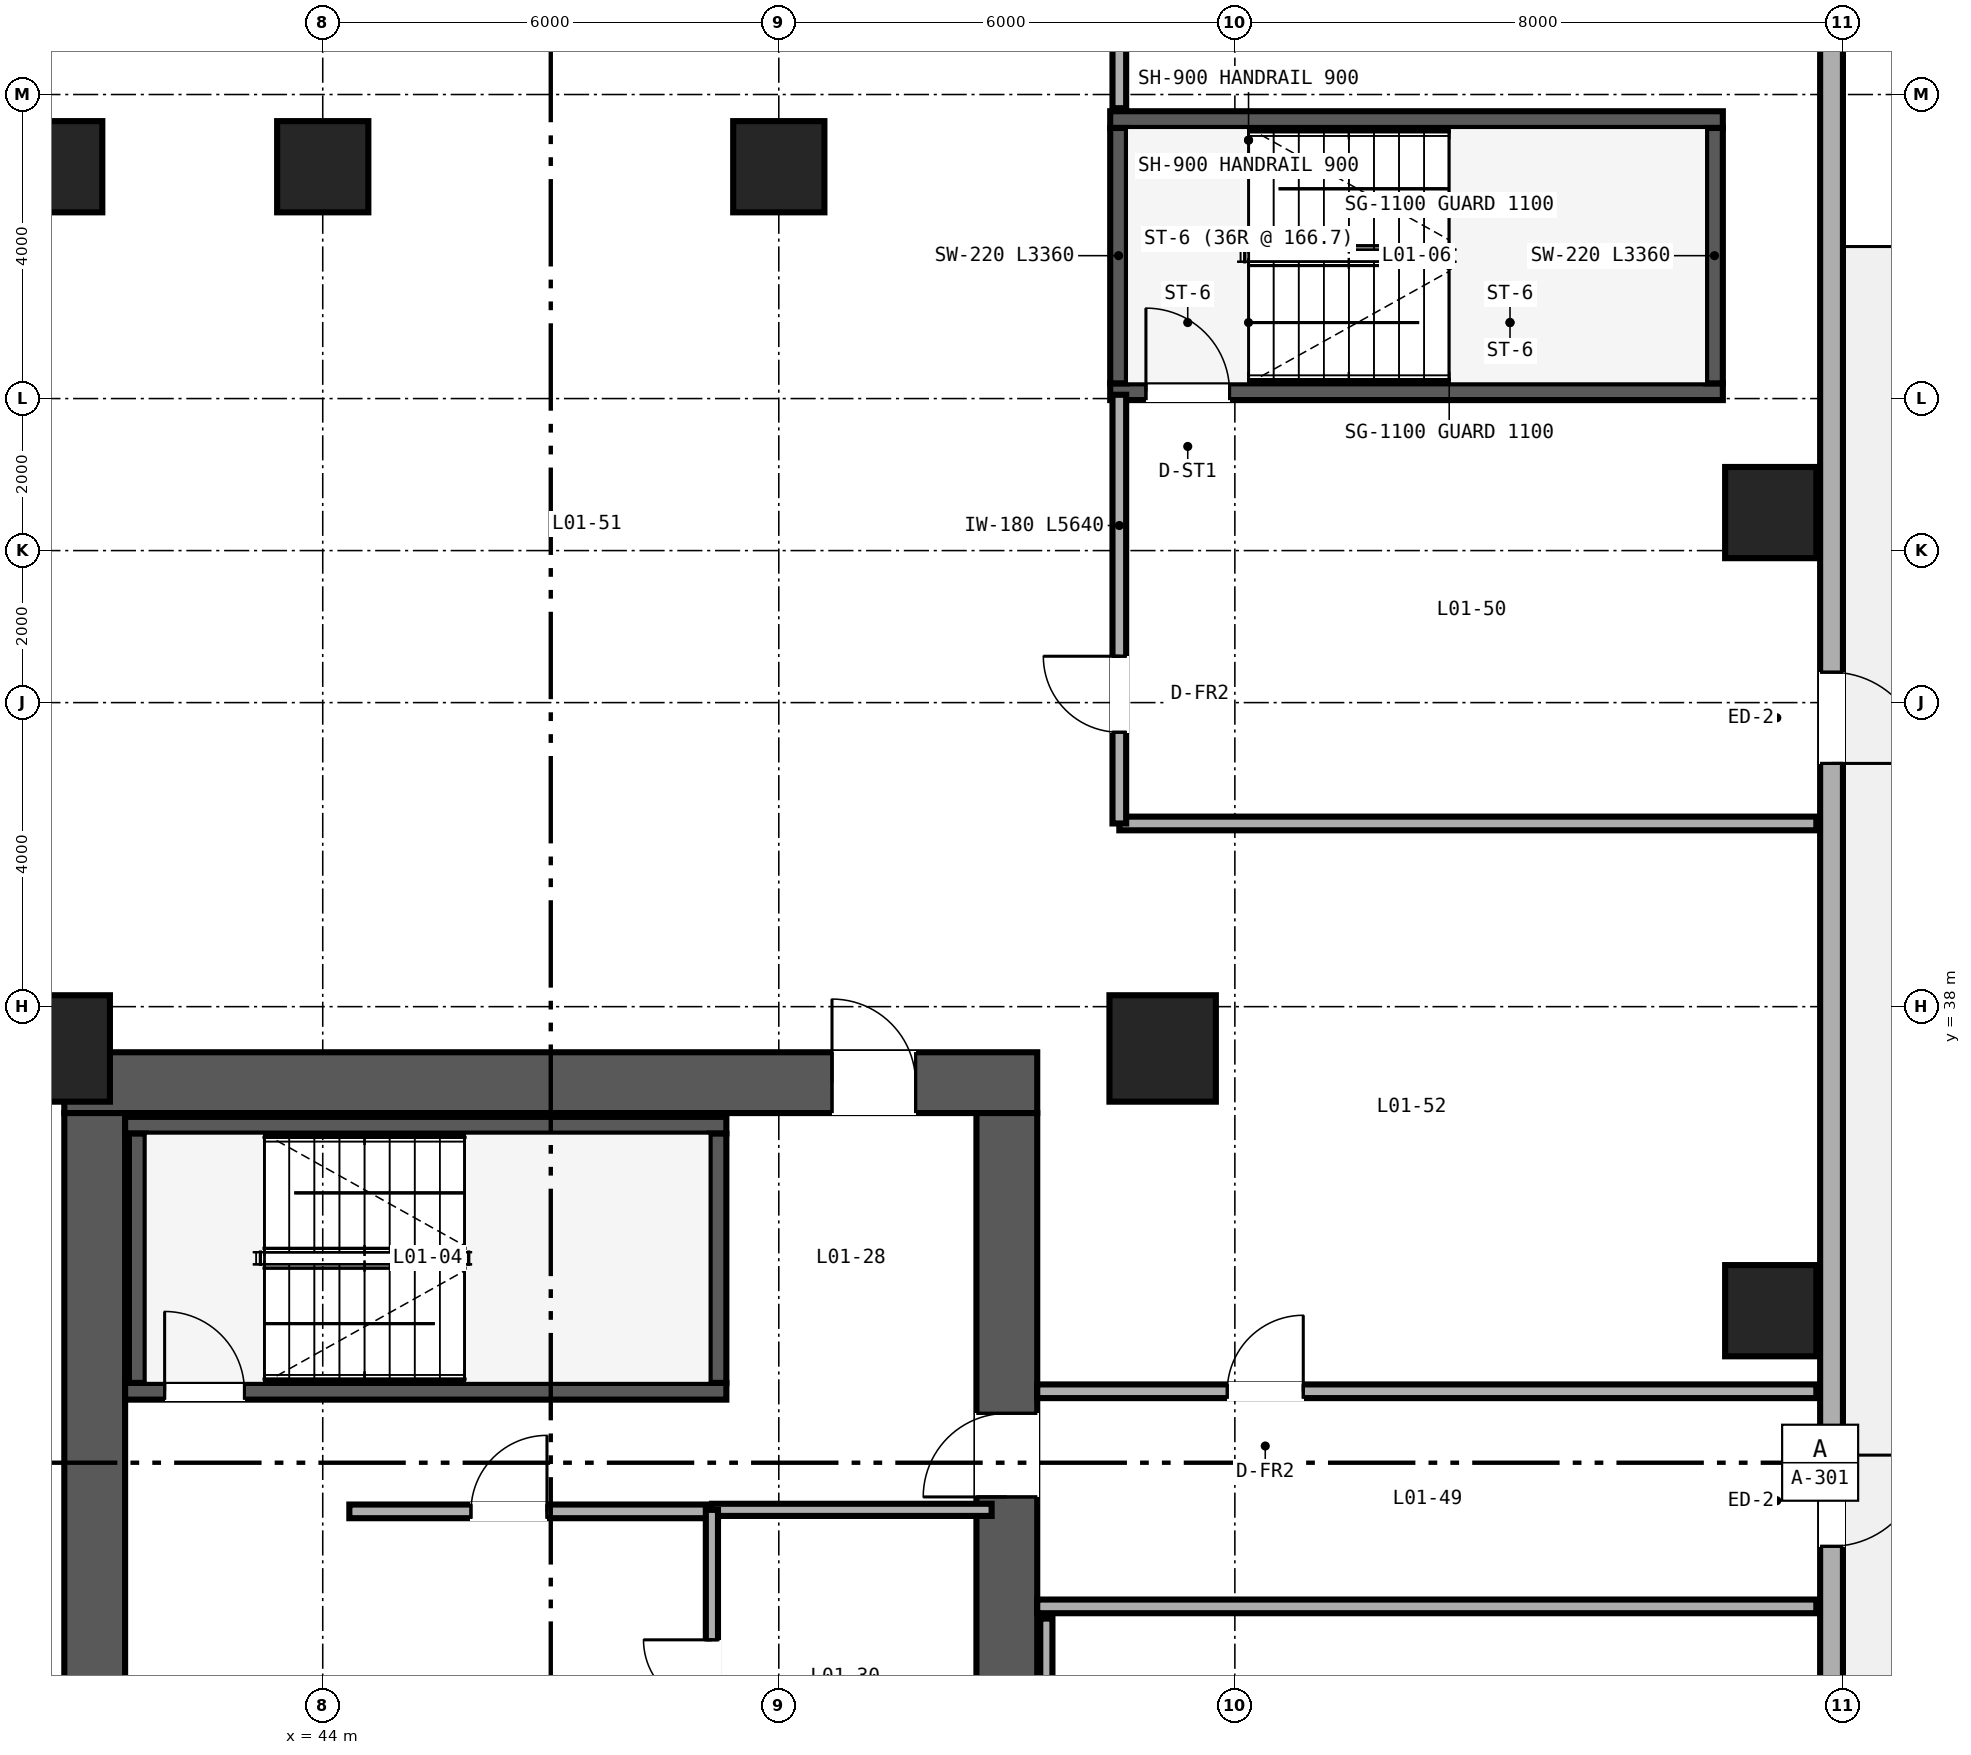
"""IFC4 building model, lengths in metres.
Left out: names, types, materials, properties, quantities, classifications, styles, units other than length and angle.
Written with IfcOpenShell. Run it as: python <this file> out.ifc"""

import sys

from ifc_helpers import new_model, si_unit, direction, frame, frame_2d, origin, origin_2d, place, context, subcontext, project, spatial, rectangle, extrude, source, transform, mapped, element, fill, save


model = new_model("IFC4")
c1 = context("Model", 3, precision=1e-05, world=origin(), true_north=direction((0.0, 1.0)))
c2 = subcontext(c1, "Body", "Model", "MODEL_VIEW")
j1 = project(units=[si_unit("LENGTHUNIT", "METRE"), si_unit("PLANEANGLEUNIT", "RADIAN")], contexts=[c1])
p1 = place(None, origin())
s1 = spatial("IfcSite", under=j1, at=p1, CompositionType="ELEMENT")
p2 = place(p1, origin())
s2 = spatial("IfcBuilding", under=s1, at=p2, CompositionType="ELEMENT")
p3 = place(p2, origin())
s3 = spatial("IfcBuildingStorey", under=s2, at=p3, CompositionType="ELEMENT", Elevation=0.0)
p4 = place(p3, frame((40.6, 37.0, 0.0), z_axis=(0.0, 0.0, 1.0), x_axis=(1.0, 0.0, 0.0)))
e1 = element("IfcWall", 1, at=p4, inside=s3, PredefinedType="SHEAR", context=c2, shape_type="SweptSolid", body=[
    extrude(rectangle(XDim=12.8, YDim=0.8, at=frame_2d((6.4, 0.0))), origin(), (0.0, 0.0, 1.0), 5.71),
])
p5 = place(p4, frame((10.1, 0.0, 0.0)))
e2 = element("IfcOpeningElement", 2, at=p5, cuts=e1, PredefinedType="OPENING", context=c2, shape_type="SweptSolid", body=[
    extrude(rectangle(XDim=1.1, YDim=2.15, at=frame_2d((0.55, 1.075))), frame((0.0, 0.41, 0.0), z_axis=(0.0, -1.0, 0.0), x_axis=(1.0, 0.0, 0.0)), (0.0, 0.0, 1.0), 0.82),
])
p6 = place(p3, frame((41.0, 15.4, 0.0), z_axis=(0.0, 0.0, 1.0), x_axis=(0.0, 1.0, 0.0)))
e3 = element("IfcWall", 3, at=p6, inside=s3, PredefinedType="SHEAR", context=c2, shape_type="SweptSolid", body=[
    extrude(rectangle(XDim=21.2, YDim=0.8, at=frame_2d((10.6, 0.0))), origin(), (0.0, 0.0, 1.0), 5.71),
])
p7 = place(p3, frame((53.0, 15.4, 0.0), z_axis=(0.0, 0.0, 1.0), x_axis=(0.0, 1.0, 0.0)))
e4 = element("IfcWall", 4, at=p7, inside=s3, PredefinedType="SHEAR", context=c2, shape_type="SweptSolid", body=[
    extrude(rectangle(XDim=21.2, YDim=0.8, at=frame_2d((10.6, 0.0))), origin(), (0.0, 0.0, 1.0), 5.71),
])
p8 = place(p7, frame((16.15, 0.0, 0.0)))
e5 = element("IfcOpeningElement", 5, at=p8, cuts=e4, PredefinedType="OPENING", context=c2, shape_type="SweptSolid", body=[
    extrude(rectangle(XDim=1.1, YDim=2.15, at=frame_2d((0.55, 1.075))), frame((0.0, 0.41, 0.0), z_axis=(0.0, -1.0, 0.0), x_axis=(1.0, 0.0, 0.0)), (0.0, 0.0, 1.0), 0.82),
])
p9 = place(p3, frame((41.4, 32.94, 0.0), z_axis=(0.0, 0.0, 1.0), x_axis=(1.0, 0.0, 0.0)))
e6 = element("IfcWall", 6, at=p9, inside=s3, PredefinedType="SHEAR", context=c2, shape_type="SweptSolid", body=[
    extrude(rectangle(XDim=7.91, YDim=0.22, at=frame_2d((3.955, 0.0))), origin(), (0.0, 0.0, 1.0), 5.8),
])
p10 = place(p9, frame((0.52, 0.0, 0.0)))
e7 = element("IfcOpeningElement", 7, at=p10, cuts=e6, PredefinedType="OPENING", context=c2, shape_type="SweptSolid", body=[
    extrude(rectangle(XDim=1.05, YDim=2.15, at=frame_2d((0.525, 1.075))), frame((0.0, 0.12, 0.0), z_axis=(0.0, -1.0, 0.0), x_axis=(1.0, 0.0, 0.0)), (0.0, 0.0, 1.0), 0.24),
])
p11 = place(p3, frame((41.4, 36.44, 0.0), z_axis=(0.0, 0.0, 1.0), x_axis=(1.0, 0.0, 0.0)))
e8 = element("IfcWall", 8, at=p11, inside=s3, PredefinedType="SHEAR", context=c2, shape_type="SweptSolid", body=[
    extrude(rectangle(XDim=7.91, YDim=0.22, at=frame_2d((3.955, 0.0))), origin(), (0.0, 0.0, 1.0), 5.8),
])
for number, where, z_axis, x_axis in (
    (9, (41.56, 33.05, 0.0), (0.0, 0.0, 1.0), (0.0, 1.0, 0.0)),
    (10, (49.2, 33.05, 0.0), (0.0, 0.0, 1.0), (0.0, 1.0, 0.0)),
):
    element("IfcWall", number, at=place(p3, frame(where, z_axis=z_axis, x_axis=x_axis)), inside=s3, PredefinedType="SHEAR", context=c2, shape_type="SweptSolid", body=[
        extrude(rectangle(XDim=3.28, YDim=0.22, at=frame_2d((1.64, 0.0))), origin(), (0.0, 0.0, 1.0), 5.8),
    ])
p12 = place(p3, frame((54.36, 46.09, 0.0), z_axis=(0.0, 0.0, 1.0), x_axis=(1.0, 0.0, 0.0)))
e11 = element("IfcWall", 11, at=p12, inside=s3, PredefinedType="SHEAR", context=c2, shape_type="SweptSolid", body=[
    extrude(rectangle(XDim=8.06, YDim=0.22, at=frame_2d((4.03, 0.0))), origin(), (0.0, 0.0, 1.0), 5.8),
])
p13 = place(p12, frame((0.47, 0.0, 0.0)))
e12 = element("IfcOpeningElement", 12, at=p13, cuts=e11, PredefinedType="OPENING", context=c2, shape_type="SweptSolid", body=[
    extrude(rectangle(XDim=1.1, YDim=2.15, at=frame_2d((0.55, 1.075))), frame((0.0, 0.12, 0.0), z_axis=(0.0, -1.0, 0.0), x_axis=(1.0, 0.0, 0.0)), (0.0, 0.0, 1.0), 0.24),
])
p14 = place(p3, frame((54.36, 49.67, 0.0), z_axis=(0.0, 0.0, 1.0), x_axis=(1.0, 0.0, 0.0)))
e13 = element("IfcWall", 13, at=p14, inside=s3, PredefinedType="SHEAR", context=c2, shape_type="SweptSolid", body=[
    extrude(rectangle(XDim=8.06, YDim=0.22, at=frame_2d((4.03, 0.0))), origin(), (0.0, 0.0, 1.0), 5.8),
])
for number, where, z_axis, x_axis in (
    (14, (54.47, 46.2, 0.0), (0.0, 0.0, 1.0), (0.0, 1.0, 0.0)),
    (15, (62.31, 46.2, 0.0), (0.0, 0.0, 1.0), (0.0, 1.0, 0.0)),
):
    element("IfcWall", number, at=place(p3, frame(where, z_axis=z_axis, x_axis=x_axis)), inside=s3, PredefinedType="SHEAR", context=c2, shape_type="SweptSolid", body=[
        extrude(rectangle(XDim=3.36, YDim=0.22, at=frame_2d((1.68, 0.0))), origin(), (0.0, 0.0, 1.0), 5.8),
    ])
m1 = source(origin(), c2, "Body", "SweptSolid", [
    extrude(rectangle(XDim=1.2, YDim=1.2, at=origin_2d()), origin(), (0.0, 0.0, 1.0), 5.71),
])
for number, where, z_axis, x_axis in (
    (16, (63.05, 34.0, 0.0), (0.0, 0.0, 1.0), (1.0, 0.0, 0.0)),
    (17, (63.05, 44.5, 0.0), (0.0, 0.0, 1.0), (1.0, 0.0, 0.0)),
):
    element("IfcColumn", number, at=place(p3, frame(where, z_axis=z_axis, x_axis=x_axis)), inside=s3, PredefinedType="COLUMN", context=c2, shape_type="MappedRepresentation", body=[
        mapped(m1, transform((0.0, 0.0, 0.0), scale=1.0)),
    ])
m2 = source(origin(), c2, "Body", "SweptSolid", [
    extrude(rectangle(XDim=1.4, YDim=1.4, at=origin_2d()), origin(), (0.0, 0.0, 1.0), 5.71),
])
for number, where, z_axis, x_axis in (
    (18, (40.5, 37.45, 0.0), (0.0, 0.0, 1.0), (1.0, 0.0, 0.0)),
    (19, (55.05, 37.45, 0.0), (0.0, 0.0, 1.0), (1.0, 0.0, 0.0)),
):
    element("IfcColumn", number, at=place(p3, frame(where, z_axis=z_axis, x_axis=x_axis)), inside=s3, PredefinedType="COLUMN", context=c2, shape_type="MappedRepresentation", body=[
        mapped(m2, transform((0.0, 0.0, 0.0), scale=1.0)),
    ])
for number, where, z_axis, x_axis in (
    (20, (40.5, 49.05, 0.0), (0.0, 0.0, 1.0), (1.0, 0.0, 0.0)),
    (21, (44.0, 49.05, 0.0), (0.0, 0.0, 1.0), (1.0, 0.0, 0.0)),
    (22, (50.0, 49.05, 0.0), (0.0, 0.0, 1.0), (1.0, 0.0, 0.0)),
):
    element("IfcColumn", number, at=place(p3, frame(where, z_axis=z_axis, x_axis=x_axis)), inside=s3, PredefinedType="COLUMN", context=c2, shape_type="MappedRepresentation", body=[
        mapped(m1, transform((0.0, 0.0, 0.0), scale=1.0)),
    ])
p15 = place(p3, frame((63.85, 51.7, 0.0), z_axis=(0.0, 0.0, 1.0), x_axis=(0.0, -1.0, 0.0)))
e23 = element("IfcWall", 23, at=p15, inside=s3, PredefinedType="SOLIDWALL", context=c2, shape_type="SweptSolid", body=[
    extrude(rectangle(XDim=51.4, YDim=0.3, at=frame_2d((25.7, 0.0))), origin(), (0.0, 0.0, 1.0), 5.71),
])
p16 = place(p15, frame((41.1, 0.0, 0.0)))
e24 = element("IfcOpeningElement", 24, at=p16, cuts=e23, PredefinedType="OPENING", context=c2, shape_type="SweptSolid", body=[
    extrude(rectangle(XDim=6.4, YDim=3.2, at=frame_2d((3.2, 1.6))), frame((0.0, 0.16, 0.0), z_axis=(0.0, -1.0, 0.0), x_axis=(1.0, 0.0, 0.0)), (0.0, 0.0, 1.0), 0.32),
])
p17 = place(p15, frame((24.7, 0.0, 0.0)))
e25 = element("IfcOpeningElement", 25, at=p17, cuts=e23, PredefinedType="OPENING", context=c2, shape_type="SweptSolid", body=[
    extrude(rectangle(XDim=4.2, YDim=3.8, at=frame_2d((2.1, 1.9))), frame((0.0, 0.16, 0.0), z_axis=(0.0, -1.0, 0.0), x_axis=(1.0, 0.0, 0.0)), (0.0, 0.0, 1.0), 0.32),
])
p18 = place(p15, frame((19.6, 0.0, 0.0)))
e26 = element("IfcOpeningElement", 26, at=p18, cuts=e23, PredefinedType="OPENING", context=c2, shape_type="SweptSolid", body=[
    extrude(rectangle(XDim=1.2, YDim=2.2, at=frame_2d((0.6, 1.1))), frame((0.0, 0.16, 0.0), z_axis=(0.0, -1.0, 0.0), x_axis=(1.0, 0.0, 0.0)), (0.0, 0.0, 1.0), 0.32),
])
p19 = place(p15, frame((9.3, 0.0, 0.0)))
e27 = element("IfcOpeningElement", 27, at=p19, cuts=e23, PredefinedType="OPENING", context=c2, shape_type="SweptSolid", body=[
    extrude(rectangle(XDim=1.2, YDim=2.2, at=frame_2d((0.6, 1.1))), frame((0.0, 0.16, 0.0), z_axis=(0.0, -1.0, 0.0), x_axis=(1.0, 0.0, 0.0)), (0.0, 0.0, 1.0), 0.32),
])
p20 = place(p3, frame((44.35, 31.36, 0.0), z_axis=(0.0, 0.0, 1.0), x_axis=(1.0, 0.0, 0.0)))
e28 = element("IfcWall", 28, at=p20, inside=s3, PredefinedType="SOLIDWALL", context=c2, shape_type="SweptSolid", body=[
    extrude(rectangle(XDim=4.85, YDim=0.18, at=frame_2d((2.425, 0.0))), origin(), (0.0, 0.0, 1.0), 4.61),
])
p21 = place(p20, frame((1.6, 0.0, 0.0)))
e29 = element("IfcOpeningElement", 29, at=p21, cuts=e28, PredefinedType="OPENING", context=c2, shape_type="SweptSolid", body=[
    extrude(rectangle(XDim=1.0, YDim=2.15, at=frame_2d((0.5, 1.075))), frame((0.0, 0.1, 0.0), z_axis=(0.0, -1.0, 0.0), x_axis=(1.0, 0.0, 0.0)), (0.0, 0.0, 1.0), 0.2),
])
p22 = place(p3, frame((49.12, 31.38, 0.0), z_axis=(0.0, 0.0, 1.0), x_axis=(1.0, 0.0, 0.0)))
e30 = element("IfcWall", 30, at=p22, inside=s3, PredefinedType="PARTITIONING", context=c2, shape_type="SweptSolid", body=[
    extrude(rectangle(XDim=3.68, YDim=0.16, at=frame_2d((1.84, 0.0))), origin(), (0.0, 0.0, 1.0), 4.61),
])
p23 = place(p3, frame((49.12, 26.97, 0.0), z_axis=(0.0, 0.0, 1.0), x_axis=(0.0, 1.0, 0.0)))
e31 = element("IfcWall", 31, at=p23, inside=s3, PredefinedType="PARTITIONING", context=c2, shape_type="SweptSolid", body=[
    extrude(rectangle(XDim=4.41, YDim=0.16, at=frame_2d((2.205, 0.0))), origin(), (0.0, 0.0, 1.0), 4.61),
])
p24 = place(p23, frame((1.8, 0.0, 0.0)))
e32 = element("IfcOpeningElement", 32, at=p24, cuts=e31, PredefinedType="OPENING", context=c2, shape_type="SweptSolid", body=[
    extrude(rectangle(XDim=0.9, YDim=2.15, at=frame_2d((0.45, 1.075))), frame((0.0, 0.09, 0.0), z_axis=(0.0, -1.0, 0.0), x_axis=(1.0, 0.0, 0.0)), (0.0, 0.0, 1.0), 0.18),
])
p25 = place(p3, frame((53.52, 21.45, 0.0), z_axis=(0.0, 0.0, 1.0), x_axis=(0.0, 1.0, 0.0)))
e33 = element("IfcWall", 33, at=p25, inside=s3, PredefinedType="PARTITIONING", context=c2, shape_type="SweptSolid", body=[
    extrude(rectangle(XDim=8.5, YDim=0.16, at=frame_2d((4.25, 0.0))), origin(), (0.0, 0.0, 1.0), 4.783),
])
p26 = place(p3, frame((53.4, 30.11, 0.0), z_axis=(0.0, 0.0, 1.0), x_axis=(1.0, 0.0, 0.0)))
e34 = element("IfcWall", 34, at=p26, inside=s3, PredefinedType="SOLIDWALL", context=c2, shape_type="SweptSolid", body=[
    extrude(rectangle(XDim=10.25, YDim=0.18, at=frame_2d((5.125, 0.0))), origin(), (0.0, 0.0, 1.0), 4.931),
])
p27 = place(p3, frame((53.4, 32.94, 0.0), z_axis=(0.0, 0.0, 1.0), x_axis=(1.0, 0.0, 0.0)))
e35 = element("IfcWall", 35, at=p27, inside=s3, PredefinedType="SOLIDWALL", context=c2, shape_type="SweptSolid", body=[
    extrude(rectangle(XDim=10.25, YDim=0.18, at=frame_2d((5.125, 0.0))), origin(), (0.0, 0.0, 1.0), 4.931),
])
p28 = place(p27, frame((2.5, 0.0, 0.0)))
e36 = element("IfcOpeningElement", 36, at=p28, cuts=e35, PredefinedType="OPENING", context=c2, shape_type="SweptSolid", body=[
    extrude(rectangle(XDim=1.0, YDim=2.15, at=frame_2d((0.5, 1.075))), frame((0.0, 0.1, 0.0), z_axis=(0.0, -1.0, 0.0), x_axis=(1.0, 0.0, 0.0)), (0.0, 0.0, 1.0), 0.2),
])
p29 = place(p3, frame((54.48, 40.41, 0.0), z_axis=(0.0, 0.0, 1.0), x_axis=(1.0, 0.0, 0.0)))
e37 = element("IfcWall", 37, at=p29, inside=s3, PredefinedType="SOLIDWALL", context=c2, shape_type="SweptSolid", body=[
    extrude(rectangle(XDim=9.17, YDim=0.18, at=frame_2d((4.585, 0.0))), origin(), (0.0, 0.0, 1.0), 4.931),
])
p30 = place(p3, frame((54.48, 40.41, 0.0), z_axis=(0.0, 0.0, 1.0), x_axis=(0.0, 1.0, 0.0)))
e38 = element("IfcWall", 38, at=p30, inside=s3, PredefinedType="SOLIDWALL", context=c2, shape_type="SweptSolid", body=[
    extrude(rectangle(XDim=5.64, YDim=0.18, at=frame_2d((2.82, 0.0))), origin(), (0.0, 0.0, 1.0), 5.71),
])
p31 = place(p30, frame((1.2, 0.0, 0.0)))
e39 = element("IfcOpeningElement", 39, at=p31, cuts=e38, PredefinedType="OPENING", context=c2, shape_type="SweptSolid", body=[
    extrude(rectangle(XDim=1.0, YDim=2.15, at=frame_2d((0.5, 1.075))), frame((0.0, 0.1, 0.0), z_axis=(0.0, -1.0, 0.0), x_axis=(1.0, 0.0, 0.0)), (0.0, 0.0, 1.0), 0.2),
])
p32 = place(p3, frame((54.48, 49.82, 0.0), z_axis=(0.0, 0.0, 1.0), x_axis=(0.0, 1.0, 0.0)))
e40 = element("IfcWall", 40, at=p32, inside=s3, PredefinedType="SOLIDWALL", context=c2, shape_type="SweptSolid", body=[
    extrude(rectangle(XDim=1.88, YDim=0.18, at=frame_2d((0.94, 0.0))), origin(), (0.0, 0.0, 1.0), 4.783),
])
m3 = source(origin(), c2, "Body", "SweptSolid", [
    extrude(rectangle(XDim=1.2, YDim=2.2, at=frame_2d((0.6, 1.1))), frame((0.0, 0.025, 0.0), z_axis=(0.0, -1.0, 0.0), x_axis=(1.0, 0.0, 0.0)), (0.0, 0.0, 1.0), 0.05),
])
p33 = place(p18, origin())
e41 = element("IfcDoor", 41, at=p33, inside=s3, OperationType="SINGLE_SWING_LEFT", PredefinedType="DOOR", context=c2, shape_type="MappedRepresentation", body=[
    mapped(m3, transform((0.0, 0.0, 0.0), scale=1.0)),
])
fill(e26, e41)
p34 = place(p19, origin())
e42 = element("IfcDoor", 42, at=p34, inside=s3, OperationType="SINGLE_SWING_RIGHT", PredefinedType="DOOR", context=c2, shape_type="MappedRepresentation", body=[
    mapped(m3, transform((0.0, 0.0, 0.0), scale=1.0)),
])
fill(e27, e42)
m4 = source(origin(), c2, "Body", "SweptSolid", [
    extrude(rectangle(XDim=1.05, YDim=2.15, at=frame_2d((0.525, 1.075))), frame((0.0, 0.025, 0.0), z_axis=(0.0, -1.0, 0.0), x_axis=(1.0, 0.0, 0.0)), (0.0, 0.0, 1.0), 0.05),
])
p35 = place(p10, origin())
e43 = element("IfcDoor", 43, at=p35, inside=s3, OperationType="SINGLE_SWING_LEFT", PredefinedType="DOOR", context=c2, shape_type="MappedRepresentation", body=[
    mapped(m4, transform((0.0, 0.0, 0.0), scale=1.0)),
])
fill(e7, e43)
m5 = source(origin(), c2, "Body", "SweptSolid", [
    extrude(rectangle(XDim=1.1, YDim=2.15, at=frame_2d((0.55, 1.075))), frame((0.0, 0.025, 0.0), z_axis=(0.0, -1.0, 0.0), x_axis=(1.0, 0.0, 0.0)), (0.0, 0.0, 1.0), 0.05),
])
p36 = place(p13, origin())
e44 = element("IfcDoor", 44, at=p36, inside=s3, OperationType="SINGLE_SWING_LEFT", PredefinedType="DOOR", context=c2, shape_type="MappedRepresentation", body=[
    mapped(m5, transform((0.0, 0.0, 0.0), scale=1.0)),
])
fill(e12, e44)
m6 = source(origin(), c2, "Body", "SweptSolid", [
    extrude(rectangle(XDim=1.0, YDim=2.15, at=frame_2d((0.5, 1.075))), frame((0.0, 0.025, 0.0), z_axis=(0.0, -1.0, 0.0), x_axis=(1.0, 0.0, 0.0)), (0.0, 0.0, 1.0), 0.05),
])
p37 = place(p21, origin())
e45 = element("IfcDoor", 45, at=p37, inside=s3, OperationType="SINGLE_SWING_RIGHT", PredefinedType="DOOR", context=c2, shape_type="MappedRepresentation", body=[
    mapped(m6, transform((0.0, 0.0, 0.0), scale=1.0)),
])
fill(e29, e45)
p38 = place(p8, origin())
e46 = element("IfcDoor", 46, at=p38, inside=s3, OperationType="SINGLE_SWING_LEFT", PredefinedType="DOOR", context=c2, shape_type="MappedRepresentation", body=[
    mapped(m5, transform((0.0, 0.0, 0.0), scale=1.0)),
])
fill(e5, e46)
p39 = place(p5, origin())
e47 = element("IfcDoor", 47, at=p39, inside=s3, OperationType="SINGLE_SWING_LEFT", PredefinedType="DOOR", context=c2, shape_type="MappedRepresentation", body=[
    mapped(m5, transform((0.0, 0.0, 0.0), scale=1.0)),
])
fill(e2, e47)
m7 = source(origin(), c2, "Body", "SweptSolid", [
    extrude(rectangle(XDim=0.9, YDim=2.15, at=frame_2d((0.45, 1.075))), frame((0.0, 0.025, 0.0), z_axis=(0.0, -1.0, 0.0), x_axis=(1.0, 0.0, 0.0)), (0.0, 0.0, 1.0), 0.05),
])
p40 = place(p24, origin())
e48 = element("IfcDoor", 48, at=p40, inside=s3, OperationType="SINGLE_SWING_RIGHT", PredefinedType="DOOR", context=c2, shape_type="MappedRepresentation", body=[
    mapped(m7, transform((0.0, 0.0, 0.0), scale=1.0)),
])
fill(e32, e48)
p41 = place(p28, origin())
e49 = element("IfcDoor", 49, at=p41, inside=s3, OperationType="SINGLE_SWING_RIGHT", PredefinedType="DOOR", context=c2, shape_type="MappedRepresentation", body=[
    mapped(m6, transform((0.0, 0.0, 0.0), scale=1.0)),
])
fill(e36, e49)
p42 = place(p31, origin())
e50 = element("IfcDoor", 50, at=p42, inside=s3, OperationType="SINGLE_SWING_RIGHT", PredefinedType="DOOR", context=c2, shape_type="MappedRepresentation", body=[
    mapped(m6, transform((0.0, 0.0, 0.0), scale=1.0)),
])
fill(e39, e50)
save(model, sys.argv[1])
